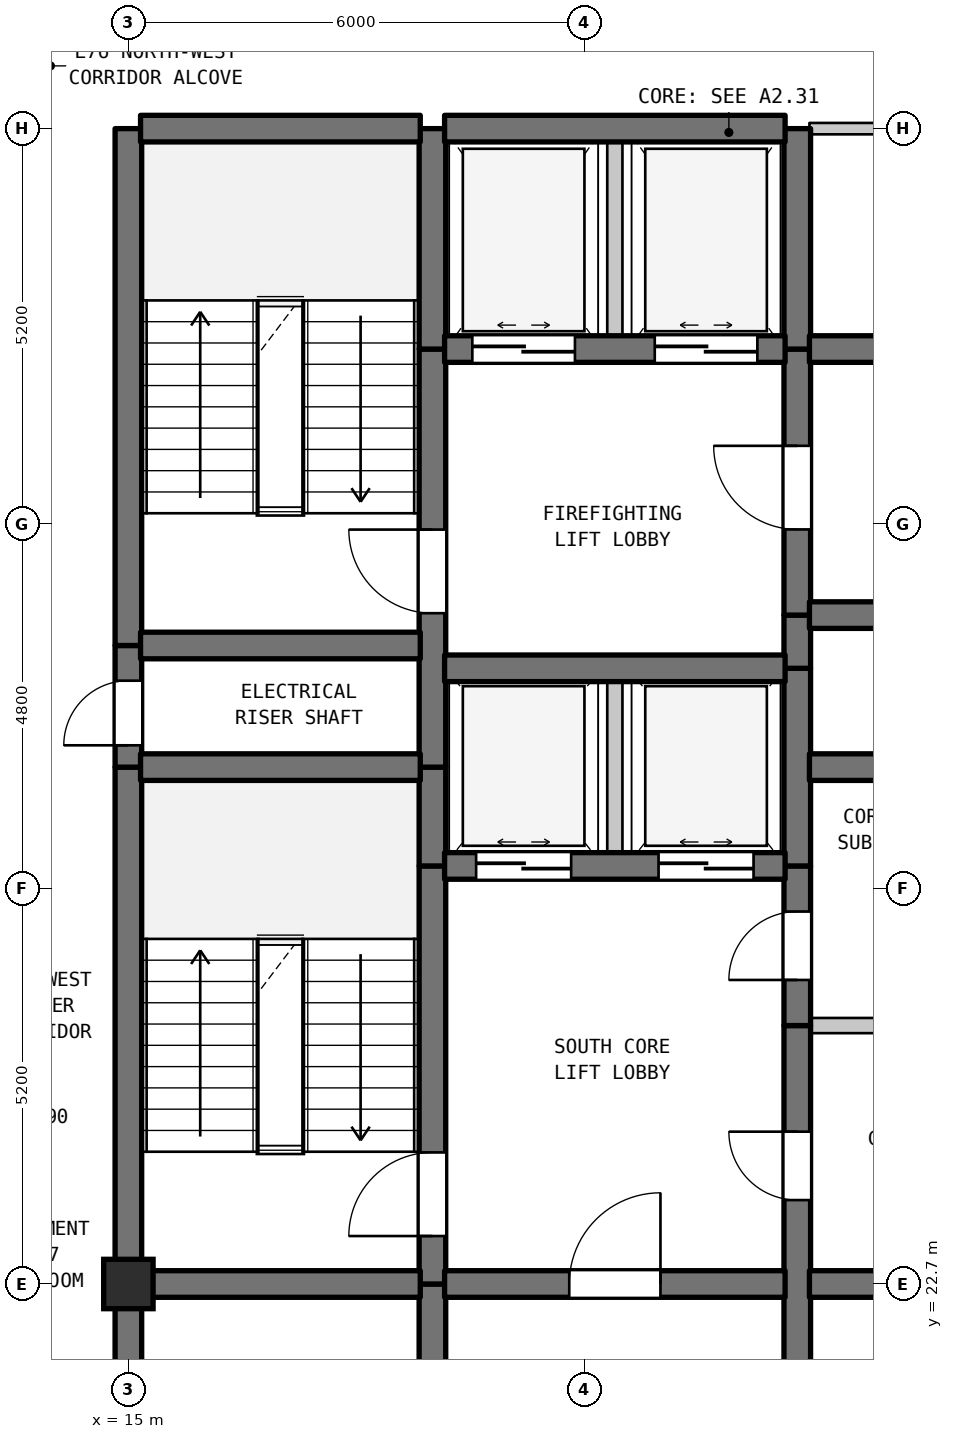
"""IFC4 building model, lengths in metres.
Left out: names, types, materials, properties, quantities, classifications, styles, units other than length and angle.
Written with IfcOpenShell. Run it as: python <this file> out.ifc"""

import sys

from ifc_helpers import new_model, si_unit, direction, frame, frame_2d, origin, origin_2d, place, context, subcontext, project, spatial, rectangle, extrude, element, fill, save


model = new_model("IFC4")
c1 = context("Model", 3, precision=1e-05, world=origin(), true_north=direction((0.0, 1.0)))
c2 = subcontext(c1, "Body", "Model", "MODEL_VIEW")
j1 = project(units=[si_unit("LENGTHUNIT", "METRE"), si_unit("PLANEANGLEUNIT", "RADIAN")], contexts=[c1])
p1 = place(None, origin())
s1 = spatial("IfcSite", under=j1, at=p1, CompositionType="ELEMENT")
p2 = place(p1, origin())
s2 = spatial("IfcBuilding", under=s1, at=p2, CompositionType="ELEMENT")
p3 = place(p2, frame((0.0, 0.0, 303.6)))
s3 = spatial("IfcBuildingStorey", under=s2, at=p3, CompositionType="ELEMENT", Elevation=303.6)
p4 = place(p3, frame((15.0, 22.7, 0.0), z_axis=(0.0, 0.0, 1.0), x_axis=(1.0, 0.0, 0.0)))
e1 = element("IfcColumn", 1, at=p4, inside=s3, PredefinedType="COLUMN", context=c2, shape_type="SweptSolid", body=[
    extrude(rectangle(XDim=0.65, YDim=0.65, at=origin_2d()), origin(), (0.0, 0.0, 1.0), 3.7),
])
p5 = place(p3, frame((15.0, 19.5, 0.0), z_axis=(0.0, 0.0, 1.0), x_axis=(0.0, 1.0, 0.0)))
e2 = element("IfcWall", 2, at=p5, inside=s3, PredefinedType="SHEAR", context=c2, shape_type="SweptSolid", body=[
    extrude(rectangle(XDim=3.2, YDim=0.35, at=frame_2d((1.6, 0.0))), origin(), (0.0, 0.0, 1.0), 3.39),
])
p6 = place(p3, frame((15.0, 22.7, 0.0), z_axis=(0.0, 0.0, 1.0), x_axis=(0.0, 1.0, 0.0)))
e3 = element("IfcWall", 3, at=p6, inside=s3, PredefinedType="SHEAR", context=c2, shape_type="SweptSolid", body=[
    extrude(rectangle(XDim=6.8, YDim=0.35, at=frame_2d((3.4, 0.0))), origin(), (0.0, 0.0, 1.0), 3.39),
])
p7 = place(p3, frame((15.0, 29.5, 0.0), z_axis=(0.0, 0.0, 1.0), x_axis=(0.0, 1.0, 0.0)))
e4 = element("IfcWall", 4, at=p7, inside=s3, PredefinedType="SHEAR", context=c2, shape_type="SweptSolid", body=[
    extrude(rectangle(XDim=1.6, YDim=0.35, at=frame_2d((0.8, 0.0))), origin(), (0.0, 0.0, 1.0), 3.39),
])
p8 = place(p7, frame((0.287, 0.0, 0.0)))
e5 = element("IfcOpeningElement", 5, at=p8, cuts=e4, PredefinedType="OPENING", context=c2, shape_type="SweptSolid", body=[
    extrude(rectangle(XDim=0.85, YDim=2.1, at=frame_2d((0.425, 1.05))), frame((0.0, 0.185, 0.0), z_axis=(0.0, -1.0, 0.0), x_axis=(1.0, 0.0, 0.0)), (0.0, 0.0, 1.0), 0.37),
])
p9 = place(p3, frame((15.0, 31.1, 0.0), z_axis=(0.0, 0.0, 1.0), x_axis=(0.0, 1.0, 0.0)))
e6 = element("IfcWall", 6, at=p9, inside=s3, PredefinedType="SHEAR", context=c2, shape_type="SweptSolid", body=[
    extrude(rectangle(XDim=6.8, YDim=0.35, at=frame_2d((3.4, 0.0))), origin(), (0.0, 0.0, 1.0), 3.39),
])
p10 = place(p3, frame((19.0, 19.5, 0.0), z_axis=(0.0, 0.0, 1.0), x_axis=(0.0, 1.0, 0.0)))
e7 = element("IfcWall", 7, at=p10, inside=s3, PredefinedType="SHEAR", context=c2, shape_type="SweptSolid", body=[
    extrude(rectangle(XDim=3.2, YDim=0.35, at=frame_2d((1.6, 0.0))), origin(), (0.0, 0.0, 1.0), 3.39),
])
p11 = place(p3, frame((19.0, 22.7, 0.0), z_axis=(0.0, 0.0, 1.0), x_axis=(0.0, 1.0, 0.0)))
e8 = element("IfcWall", 8, at=p11, inside=s3, PredefinedType="SHEAR", context=c2, shape_type="SweptSolid", body=[
    extrude(rectangle(XDim=5.5, YDim=0.35, at=frame_2d((2.75, 0.0))), origin(), (0.0, 0.0, 1.0), 3.39),
])
p12 = place(p11, frame((0.631, 0.0, 0.0)))
e9 = element("IfcOpeningElement", 9, at=p12, cuts=e8, PredefinedType="OPENING", context=c2, shape_type="SweptSolid", body=[
    extrude(rectangle(XDim=1.1, YDim=2.15, at=frame_2d((0.55, 1.075))), frame((0.0, 0.185, 0.0), z_axis=(0.0, -1.0, 0.0), x_axis=(1.0, 0.0, 0.0)), (0.0, 0.0, 1.0), 0.37),
])
p13 = place(p3, frame((19.0, 28.2, 0.0), z_axis=(0.0, 0.0, 1.0), x_axis=(0.0, 1.0, 0.0)))
e10 = element("IfcWall", 10, at=p13, inside=s3, PredefinedType="SHEAR", context=c2, shape_type="SweptSolid", body=[
    extrude(rectangle(XDim=1.3, YDim=0.35, at=frame_2d((0.65, 0.0))), origin(), (0.0, 0.0, 1.0), 3.39),
])
p14 = place(p3, frame((19.0, 29.5, 0.0), z_axis=(0.0, 0.0, 1.0), x_axis=(0.0, 1.0, 0.0)))
e11 = element("IfcWall", 11, at=p14, inside=s3, PredefinedType="SHEAR", context=c2, shape_type="SweptSolid", body=[
    extrude(rectangle(XDim=5.5, YDim=0.35, at=frame_2d((2.75, 0.0))), origin(), (0.0, 0.0, 1.0), 3.39),
])
p15 = place(p14, frame((2.025, 0.0, 0.0)))
e12 = element("IfcOpeningElement", 12, at=p15, cuts=e11, PredefinedType="OPENING", context=c2, shape_type="SweptSolid", body=[
    extrude(rectangle(XDim=1.1, YDim=2.15, at=frame_2d((0.55, 1.075))), frame((0.0, 0.185, 0.0), z_axis=(0.0, -1.0, 0.0), x_axis=(1.0, 0.0, 0.0)), (0.0, 0.0, 1.0), 0.37),
])
p16 = place(p3, frame((19.0, 35.0, 0.0), z_axis=(0.0, 0.0, 1.0), x_axis=(0.0, 1.0, 0.0)))
e13 = element("IfcWall", 13, at=p16, inside=s3, PredefinedType="SHEAR", context=c2, shape_type="SweptSolid", body=[
    extrude(rectangle(XDim=2.9, YDim=0.35, at=frame_2d((1.45, 0.0))), origin(), (0.0, 0.0, 1.0), 3.39),
])
p17 = place(p3, frame((21.4, 28.2, 0.0), z_axis=(0.0, 0.0, 1.0), x_axis=(0.0, 1.0, 0.0)))
e14 = element("IfcWall", 14, at=p17, inside=s3, PredefinedType="STANDARD", context=c2, shape_type="SweptSolid", body=[
    extrude(rectangle(XDim=2.6, YDim=0.2, at=frame_2d((1.3, 0.0))), origin(), (0.0, 0.0, 1.0), 3.39),
])
p18 = place(p3, frame((21.4, 35.0, 0.0), z_axis=(0.0, 0.0, 1.0), x_axis=(0.0, 1.0, 0.0)))
e15 = element("IfcWall", 15, at=p18, inside=s3, PredefinedType="STANDARD", context=c2, shape_type="SweptSolid", body=[
    extrude(rectangle(XDim=2.9, YDim=0.2, at=frame_2d((1.45, 0.0))), origin(), (0.0, 0.0, 1.0), 3.39),
])
p19 = place(p3, frame((23.8, 19.5, 0.0), z_axis=(0.0, 0.0, 1.0), x_axis=(0.0, 1.0, 0.0)))
e16 = element("IfcWall", 16, at=p19, inside=s3, PredefinedType="SHEAR", context=c2, shape_type="SweptSolid", body=[
    extrude(rectangle(XDim=6.6, YDim=0.35, at=frame_2d((3.3, 0.0))), origin(), (0.0, 0.0, 1.0), 3.39),
])
p20 = place(p19, frame((4.304, 0.0, 0.0)))
e17 = element("IfcOpeningElement", 17, at=p20, cuts=e16, PredefinedType="OPENING", context=c2, shape_type="SweptSolid", body=[
    extrude(rectangle(XDim=0.9, YDim=2.15, at=frame_2d((0.45, 1.075))), frame((0.0, 0.185, 0.0), z_axis=(0.0, -1.0, 0.0), x_axis=(1.0, 0.0, 0.0)), (0.0, 0.0, 1.0), 0.37),
])
p21 = place(p3, frame((23.8, 26.1, 0.0), z_axis=(0.0, 0.0, 1.0), x_axis=(0.0, 1.0, 0.0)))
e18 = element("IfcWall", 18, at=p21, inside=s3, PredefinedType="SHEAR", context=c2, shape_type="SweptSolid", body=[
    extrude(rectangle(XDim=2.1, YDim=0.35, at=frame_2d((1.05, 0.0))), origin(), (0.0, 0.0, 1.0), 3.39),
])
p22 = place(p21, frame((0.6, 0.0, 0.0)))
e19 = element("IfcOpeningElement", 19, at=p22, cuts=e18, PredefinedType="OPENING", context=c2, shape_type="SweptSolid", body=[
    extrude(rectangle(XDim=0.9, YDim=2.15, at=frame_2d((0.45, 1.075))), frame((0.0, 0.185, 0.0), z_axis=(0.0, -1.0, 0.0), x_axis=(1.0, 0.0, 0.0)), (0.0, 0.0, 1.0), 0.37),
])
p23 = place(p3, frame((23.8, 28.2, 0.0), z_axis=(0.0, 0.0, 1.0), x_axis=(0.0, 1.0, 0.0)))
e20 = element("IfcWall", 20, at=p23, inside=s3, PredefinedType="SHEAR", context=c2, shape_type="SweptSolid", body=[
    extrude(rectangle(XDim=2.6, YDim=0.35, at=frame_2d((1.3, 0.0))), origin(), (0.0, 0.0, 1.0), 3.39),
])
p24 = place(p3, frame((23.8, 30.8, 0.0), z_axis=(0.0, 0.0, 1.0), x_axis=(0.0, 1.0, 0.0)))
e21 = element("IfcWall", 21, at=p24, inside=s3, PredefinedType="SHEAR", context=c2, shape_type="SweptSolid", body=[
    extrude(rectangle(XDim=0.7, YDim=0.35, at=frame_2d((0.35, 0.0))), origin(), (0.0, 0.0, 1.0), 3.39),
])
p25 = place(p3, frame((23.8, 31.5, 0.0), z_axis=(0.0, 0.0, 1.0), x_axis=(0.0, 1.0, 0.0)))
e22 = element("IfcWall", 22, at=p25, inside=s3, PredefinedType="SHEAR", context=c2, shape_type="SweptSolid", body=[
    extrude(rectangle(XDim=3.5, YDim=0.35, at=frame_2d((1.75, 0.0))), origin(), (0.0, 0.0, 1.0), 3.39),
])
p26 = place(p25, frame((1.127, 0.0, 0.0)))
e23 = element("IfcOpeningElement", 23, at=p26, cuts=e22, PredefinedType="OPENING", context=c2, shape_type="SweptSolid", body=[
    extrude(rectangle(XDim=1.1, YDim=2.15, at=frame_2d((0.55, 1.075))), frame((0.0, 0.185, 0.0), z_axis=(0.0, -1.0, 0.0), x_axis=(1.0, 0.0, 0.0)), (0.0, 0.0, 1.0), 0.37),
])
p27 = place(p3, frame((23.8, 35.0, 0.0), z_axis=(0.0, 0.0, 1.0), x_axis=(0.0, 1.0, 0.0)))
e24 = element("IfcWall", 24, at=p27, inside=s3, PredefinedType="SHEAR", context=c2, shape_type="SweptSolid", body=[
    extrude(rectangle(XDim=2.9, YDim=0.35, at=frame_2d((1.45, 0.0))), origin(), (0.0, 0.0, 1.0), 3.39),
])
p28 = place(p3, frame((15.16, 22.7, 0.0), z_axis=(0.0, 0.0, 1.0), x_axis=(1.0, 0.0, 0.0)))
e25 = element("IfcWall", 25, at=p28, inside=s3, PredefinedType="SHEAR", context=c2, shape_type="SweptSolid", body=[
    extrude(rectangle(XDim=3.68, YDim=0.35, at=frame_2d((1.84, 0.0))), origin(), (0.0, 0.0, 1.0), 3.39),
])
p29 = place(p3, frame((19.16, 22.7, 0.0), z_axis=(0.0, 0.0, 1.0), x_axis=(1.0, 0.0, 0.0)))
e26 = element("IfcWall", 26, at=p29, inside=s3, PredefinedType="SHEAR", context=c2, shape_type="SweptSolid", body=[
    extrude(rectangle(XDim=4.48, YDim=0.35, at=frame_2d((2.24, 0.0))), origin(), (0.0, 0.0, 1.0), 3.39),
])
p30 = place(p29, frame((1.64, 0.0, 0.0)))
e27 = element("IfcOpeningElement", 27, at=p30, cuts=e26, PredefinedType="OPENING", context=c2, shape_type="SweptSolid", body=[
    extrude(rectangle(XDim=1.2, YDim=2.2, at=frame_2d((0.6, 1.1))), frame((0.0, 0.185, 0.0), z_axis=(0.0, -1.0, 0.0), x_axis=(1.0, 0.0, 0.0)), (0.0, 0.0, 1.0), 0.37),
])
p31 = place(p3, frame((23.96, 22.7, 0.0), z_axis=(0.0, 0.0, 1.0), x_axis=(1.0, 0.0, 0.0)))
e28 = element("IfcWall", 28, at=p31, inside=s3, PredefinedType="SHEAR", context=c2, shape_type="SweptSolid", body=[
    extrude(rectangle(XDim=1.855, YDim=0.35, at=frame_2d((0.927, 0.0))), origin(), (0.0, 0.0, 1.0), 3.39),
])
p32 = place(p3, frame((23.96, 26.1, 0.0), z_axis=(0.0, 0.0, 1.0), x_axis=(1.0, 0.0, 0.0)))
e29 = element("IfcWall", 29, at=p32, inside=s3, PredefinedType="STANDARD", context=c2, shape_type="SweptSolid", body=[
    extrude(rectangle(XDim=3.18, YDim=0.2, at=frame_2d((1.59, 0.0))), origin(), (0.0, 0.0, 1.0), 3.39),
])
p33 = place(p3, frame((19.16, 28.2, 0.0), z_axis=(0.0, 0.0, 1.0), x_axis=(1.0, 0.0, 0.0)))
e30 = element("IfcWall", 30, at=p33, inside=s3, PredefinedType="SHEAR", context=c2, shape_type="SweptSolid", body=[
    extrude(rectangle(XDim=4.48, YDim=0.35, at=frame_2d((2.24, 0.0))), origin(), (0.0, 0.0, 1.0), 3.39),
])
p34 = place(p33, frame((0.415, 0.0, 0.0)))
e31 = element("IfcOpeningElement", 31, at=p34, cuts=e30, PredefinedType="OPENING", context=c2, shape_type="SweptSolid", body=[
    extrude(rectangle(XDim=1.25, YDim=2.2, at=frame_2d((0.625, 1.1))), frame((0.0, 0.185, 0.0), z_axis=(0.0, -1.0, 0.0), x_axis=(1.0, 0.0, 0.0)), (0.0, 0.0, 1.0), 0.37),
])
p35 = place(p33, frame((2.815, 0.0, 0.0)))
e32 = element("IfcOpeningElement", 32, at=p35, cuts=e30, PredefinedType="OPENING", context=c2, shape_type="SweptSolid", body=[
    extrude(rectangle(XDim=1.25, YDim=2.2, at=frame_2d((0.625, 1.1))), frame((0.0, 0.185, 0.0), z_axis=(0.0, -1.0, 0.0), x_axis=(1.0, 0.0, 0.0)), (0.0, 0.0, 1.0), 0.37),
])
p36 = place(p3, frame((15.16, 29.5, 0.0), z_axis=(0.0, 0.0, 1.0), x_axis=(1.0, 0.0, 0.0)))
e33 = element("IfcWall", 33, at=p36, inside=s3, PredefinedType="SHEAR", context=c2, shape_type="SweptSolid", body=[
    extrude(rectangle(XDim=3.68, YDim=0.35, at=frame_2d((1.84, 0.0))), origin(), (0.0, 0.0, 1.0), 3.39),
])
p37 = place(p3, frame((23.96, 29.5, 0.0), z_axis=(0.0, 0.0, 1.0), x_axis=(1.0, 0.0, 0.0)))
e34 = element("IfcWall", 34, at=p37, inside=s3, PredefinedType="SHEAR", context=c2, shape_type="SweptSolid", body=[
    extrude(rectangle(XDim=3.18, YDim=0.35, at=frame_2d((1.59, 0.0))), origin(), (0.0, 0.0, 1.0), 3.39),
])
p38 = place(p3, frame((19.16, 30.8, 0.0), z_axis=(0.0, 0.0, 1.0), x_axis=(1.0, 0.0, 0.0)))
e35 = element("IfcWall", 35, at=p38, inside=s3, PredefinedType="SHEAR", context=c2, shape_type="SweptSolid", body=[
    extrude(rectangle(XDim=4.48, YDim=0.35, at=frame_2d((2.24, 0.0))), origin(), (0.0, 0.0, 1.0), 3.39),
])
p39 = place(p3, frame((15.16, 31.1, 0.0), z_axis=(0.0, 0.0, 1.0), x_axis=(1.0, 0.0, 0.0)))
e36 = element("IfcWall", 36, at=p39, inside=s3, PredefinedType="SHEAR", context=c2, shape_type="SweptSolid", body=[
    extrude(rectangle(XDim=3.68, YDim=0.35, at=frame_2d((1.84, 0.0))), origin(), (0.0, 0.0, 1.0), 3.39),
])
p40 = place(p3, frame((23.96, 31.5, 0.0), z_axis=(0.0, 0.0, 1.0), x_axis=(1.0, 0.0, 0.0)))
e37 = element("IfcWall", 37, at=p40, inside=s3, PredefinedType="SHEAR", context=c2, shape_type="SweptSolid", body=[
    extrude(rectangle(XDim=3.18, YDim=0.35, at=frame_2d((1.59, 0.0))), origin(), (0.0, 0.0, 1.0), 3.39),
])
p41 = place(p40, frame((1.094, 0.0, 0.0)))
e38 = element("IfcOpeningElement", 38, at=p41, cuts=e37, PredefinedType="OPENING", context=c2, shape_type="SweptSolid", body=[
    extrude(rectangle(XDim=0.85, YDim=2.1, at=frame_2d((0.425, 1.05))), frame((0.0, 0.185, 0.0), z_axis=(0.0, -1.0, 0.0), x_axis=(1.0, 0.0, 0.0)), (0.0, 0.0, 1.0), 0.37),
])
p42 = place(p3, frame((19.16, 35.0, 0.0), z_axis=(0.0, 0.0, 1.0), x_axis=(1.0, 0.0, 0.0)))
e39 = element("IfcWall", 39, at=p42, inside=s3, PredefinedType="SHEAR", context=c2, shape_type="SweptSolid", body=[
    extrude(rectangle(XDim=4.48, YDim=0.35, at=frame_2d((2.24, 0.0))), origin(), (0.0, 0.0, 1.0), 3.39),
])
p43 = place(p42, frame((0.365, 0.0, 0.0)))
e40 = element("IfcOpeningElement", 40, at=p43, cuts=e39, PredefinedType="OPENING", context=c2, shape_type="SweptSolid", body=[
    extrude(rectangle(XDim=1.35, YDim=2.2, at=frame_2d((0.675, 1.1))), frame((0.0, 0.185, 0.0), z_axis=(0.0, -1.0, 0.0), x_axis=(1.0, 0.0, 0.0)), (0.0, 0.0, 1.0), 0.37),
])
p44 = place(p42, frame((2.765, 0.0, 0.0)))
e41 = element("IfcOpeningElement", 41, at=p44, cuts=e39, PredefinedType="OPENING", context=c2, shape_type="SweptSolid", body=[
    extrude(rectangle(XDim=1.35, YDim=2.2, at=frame_2d((0.675, 1.1))), frame((0.0, 0.185, 0.0), z_axis=(0.0, -1.0, 0.0), x_axis=(1.0, 0.0, 0.0)), (0.0, 0.0, 1.0), 0.37),
])
p45 = place(p3, frame((23.96, 35.0, 0.0), z_axis=(0.0, 0.0, 1.0), x_axis=(1.0, 0.0, 0.0)))
e42 = element("IfcWall", 42, at=p45, inside=s3, PredefinedType="SHEAR", context=c2, shape_type="SweptSolid", body=[
    extrude(rectangle(XDim=3.995, YDim=0.35, at=frame_2d((1.998, 0.0))), origin(), (0.0, 0.0, 1.0), 3.39),
])
p46 = place(p45, frame((1.393, 0.0, 0.0)))
e43 = element("IfcOpeningElement", 43, at=p46, cuts=e42, PredefinedType="OPENING", context=c2, shape_type="SweptSolid", body=[
    extrude(rectangle(XDim=0.95, YDim=2.15, at=frame_2d((0.475, 1.075))), frame((0.0, 0.185, 0.0), z_axis=(0.0, -1.0, 0.0), x_axis=(1.0, 0.0, 0.0)), (0.0, 0.0, 1.0), 0.37),
])
p47 = place(p3, frame((15.16, 37.9, 0.0), z_axis=(0.0, 0.0, 1.0), x_axis=(1.0, 0.0, 0.0)))
e44 = element("IfcWall", 44, at=p47, inside=s3, PredefinedType="SHEAR", context=c2, shape_type="SweptSolid", body=[
    extrude(rectangle(XDim=3.68, YDim=0.35, at=frame_2d((1.84, 0.0))), origin(), (0.0, 0.0, 1.0), 3.39),
])
p48 = place(p3, frame((19.16, 37.9, 0.0), z_axis=(0.0, 0.0, 1.0), x_axis=(1.0, 0.0, 0.0)))
e45 = element("IfcWall", 45, at=p48, inside=s3, PredefinedType="SHEAR", context=c2, shape_type="SweptSolid", body=[
    extrude(rectangle(XDim=4.48, YDim=0.35, at=frame_2d((2.24, 0.0))), origin(), (0.0, 0.0, 1.0), 3.39),
])
p49 = place(p3, frame((23.96, 37.9, 0.0), z_axis=(0.0, 0.0, 1.0), x_axis=(1.0, 0.0, 0.0)))
e46 = element("IfcWall", 46, at=p49, inside=s3, PredefinedType="STANDARD", context=c2, shape_type="SweptSolid", body=[
    extrude(rectangle(XDim=3.995, YDim=0.15, at=frame_2d((1.998, 0.0))), origin(), (0.0, 0.0, 1.0), 2.89),
])
p50 = place(p8, origin())
e47 = element("IfcDoor", 47, at=p50, inside=s3, OperationType="SINGLE_SWING_LEFT", PredefinedType="DOOR", context=c2, shape_type="SweptSolid", body=[
    extrude(rectangle(XDim=0.85, YDim=2.1, at=frame_2d((0.425, 1.05))), frame((0.0, 0.025, 0.0), z_axis=(0.0, -1.0, 0.0), x_axis=(1.0, 0.0, 0.0)), (0.0, 0.0, 1.0), 0.05),
])
fill(e5, e47)
p51 = place(p12, origin())
e48 = element("IfcDoor", 48, at=p51, inside=s3, OperationType="SINGLE_SWING_LEFT", PredefinedType="DOOR", context=c2, shape_type="SweptSolid", body=[
    extrude(rectangle(XDim=1.1, YDim=2.15, at=frame_2d((0.55, 1.075))), frame((0.0, 0.025, 0.0), z_axis=(0.0, -1.0, 0.0), x_axis=(1.0, 0.0, 0.0)), (0.0, 0.0, 1.0), 0.05),
])
fill(e9, e48)
p52 = place(p15, origin())
e49 = element("IfcDoor", 49, at=p52, inside=s3, OperationType="SINGLE_SWING_RIGHT", PredefinedType="DOOR", context=c2, shape_type="SweptSolid", body=[
    extrude(rectangle(XDim=1.1, YDim=2.15, at=frame_2d((0.55, 1.075))), frame((0.0, 0.025, 0.0), z_axis=(0.0, -1.0, 0.0), x_axis=(1.0, 0.0, 0.0)), (0.0, 0.0, 1.0), 0.05),
])
fill(e12, e49)
p53 = place(p20, origin())
e50 = element("IfcDoor", 50, at=p53, inside=s3, OperationType="SINGLE_SWING_RIGHT", PredefinedType="DOOR", context=c2, shape_type="SweptSolid", body=[
    extrude(rectangle(XDim=0.9, YDim=2.15, at=frame_2d((0.45, 1.075))), frame((0.0, 0.025, 0.0), z_axis=(0.0, -1.0, 0.0), x_axis=(1.0, 0.0, 0.0)), (0.0, 0.0, 1.0), 0.05),
])
fill(e17, e50)
p54 = place(p22, origin())
e51 = element("IfcDoor", 51, at=p54, inside=s3, OperationType="SINGLE_SWING_LEFT", PredefinedType="DOOR", context=c2, shape_type="SweptSolid", body=[
    extrude(rectangle(XDim=0.9, YDim=2.15, at=frame_2d((0.45, 1.075))), frame((0.0, 0.025, 0.0), z_axis=(0.0, -1.0, 0.0), x_axis=(1.0, 0.0, 0.0)), (0.0, 0.0, 1.0), 0.05),
])
fill(e19, e51)
p55 = place(p26, origin())
e52 = element("IfcDoor", 52, at=p55, inside=s3, OperationType="SINGLE_SWING_RIGHT", PredefinedType="DOOR", context=c2, shape_type="SweptSolid", body=[
    extrude(rectangle(XDim=1.1, YDim=2.15, at=frame_2d((0.55, 1.075))), frame((0.0, 0.025, 0.0), z_axis=(0.0, -1.0, 0.0), x_axis=(1.0, 0.0, 0.0)), (0.0, 0.0, 1.0), 0.05),
])
fill(e23, e52)
p56 = place(p30, origin())
e53 = element("IfcDoor", 53, at=p56, inside=s3, OperationType="SINGLE_SWING_RIGHT", PredefinedType="DOOR", context=c2, shape_type="SweptSolid", body=[
    extrude(rectangle(XDim=1.2, YDim=2.2, at=frame_2d((0.6, 1.1))), frame((0.0, 0.025, 0.0), z_axis=(0.0, -1.0, 0.0), x_axis=(1.0, 0.0, 0.0)), (0.0, 0.0, 1.0), 0.05),
])
fill(e27, e53)
p57 = place(p34, origin())
e54 = element("IfcDoor", 54, at=p57, inside=s3, OperationType="DOUBLE_DOOR_SLIDING", PredefinedType="DOOR", context=c2, shape_type="SweptSolid", body=[
    extrude(rectangle(XDim=1.25, YDim=2.2, at=frame_2d((0.625, 1.1))), frame((0.0, 0.025, 0.0), z_axis=(0.0, -1.0, 0.0), x_axis=(1.0, 0.0, 0.0)), (0.0, 0.0, 1.0), 0.05),
])
fill(e31, e54)
p58 = place(p35, origin())
e55 = element("IfcDoor", 55, at=p58, inside=s3, OperationType="DOUBLE_DOOR_SLIDING", PredefinedType="DOOR", context=c2, shape_type="SweptSolid", body=[
    extrude(rectangle(XDim=1.25, YDim=2.2, at=frame_2d((0.625, 1.1))), frame((0.0, 0.025, 0.0), z_axis=(0.0, -1.0, 0.0), x_axis=(1.0, 0.0, 0.0)), (0.0, 0.0, 1.0), 0.05),
])
fill(e32, e55)
p59 = place(p43, origin())
e56 = element("IfcDoor", 56, at=p59, inside=s3, OperationType="DOUBLE_DOOR_SLIDING", PredefinedType="DOOR", context=c2, shape_type="SweptSolid", body=[
    extrude(rectangle(XDim=1.35, YDim=2.2, at=frame_2d((0.675, 1.1))), frame((0.0, 0.025, 0.0), z_axis=(0.0, -1.0, 0.0), x_axis=(1.0, 0.0, 0.0)), (0.0, 0.0, 1.0), 0.05),
])
fill(e40, e56)
p60 = place(p44, origin())
e57 = element("IfcDoor", 57, at=p60, inside=s3, OperationType="DOUBLE_DOOR_SLIDING", PredefinedType="DOOR", context=c2, shape_type="SweptSolid", body=[
    extrude(rectangle(XDim=1.35, YDim=2.2, at=frame_2d((0.675, 1.1))), frame((0.0, 0.025, 0.0), z_axis=(0.0, -1.0, 0.0), x_axis=(1.0, 0.0, 0.0)), (0.0, 0.0, 1.0), 0.05),
])
fill(e41, e57)
save(model, sys.argv[1])
